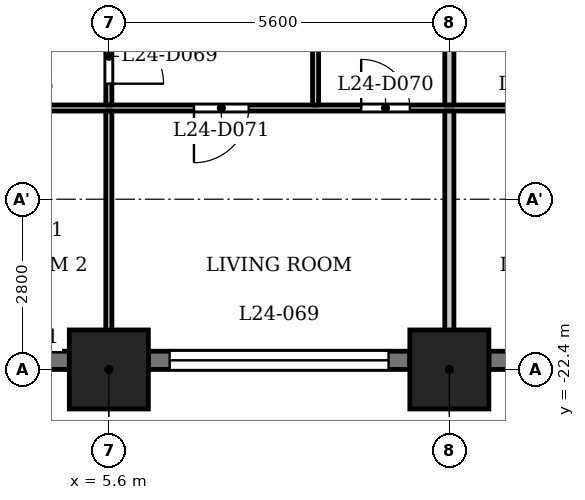
"""IFC4 building model, lengths in metres.
Left out: names, types, materials, properties, quantities, classifications, styles, units other than length and angle.
Written with IfcOpenShell. Run it as: python <this file> out.ifc"""

import sys

from ifc_helpers import new_model, si_unit, direction, frame, frame_2d, origin, origin_2d, place, context, subcontext, project, spatial, rectangle, extrude, element, fill, save


model = new_model("IFC4")
c1 = context("Model", 3, precision=1e-05, world=origin(), true_north=direction((0.0, 1.0)))
c2 = subcontext(c1, "Body", "Model", "MODEL_VIEW")
j1 = project(units=[si_unit("LENGTHUNIT", "METRE"), si_unit("PLANEANGLEUNIT", "RADIAN")], contexts=[c1])
p1 = place(None, origin())
s1 = spatial("IfcSite", under=j1, at=p1, CompositionType="ELEMENT")
p2 = place(p1, origin())
s2 = spatial("IfcBuilding", under=s1, at=p2, CompositionType="ELEMENT")
p3 = place(p2, frame((0.0, 0.0, 97.3)))
s3 = spatial("IfcBuildingStorey", under=s2, at=p3, CompositionType="ELEMENT", Elevation=97.3)
for number, where, z_axis, x_axis in (
    (1, (5.6, -22.4, 0.0), (0.0, 0.0, 1.0), (1.0, 0.0, 0.0)),
    (2, (11.2, -22.4, 0.0), (0.0, 0.0, 1.0), (1.0, 0.0, 0.0)),
):
    element("IfcColumn", number, at=place(p3, frame(where, z_axis=z_axis, x_axis=x_axis)), inside=s3, PredefinedType="COLUMN", context=c2, shape_type="SweptSolid", body=[
        extrude(rectangle(XDim=1.3, YDim=1.3, at=origin_2d()), origin(), (0.0, 0.0, 1.0), 3.5),
    ])
p4 = place(p3, frame((0.65, -22.25, 0.0), z_axis=(0.0, 0.0, 1.0), x_axis=(1.0, 0.0, 0.0)))
e3 = element("IfcWall", 3, at=p4, inside=s3, PredefinedType="SOLIDWALL", context=c2, shape_type="SweptSolid", body=[
    extrude(rectangle(XDim=4.3, YDim=0.3, at=frame_2d((2.15, 0.0))), origin(), (0.0, 0.0, 1.0), 2.4),
])
p5 = place(p4, frame((0.438, 0.0, 0.6)))
e4 = element("IfcOpeningElement", 4, at=p5, cuts=e3, PredefinedType="OPENING", context=c2, shape_type="SweptSolid", body=[
    extrude(rectangle(XDim=1.2, YDim=1.55, at=frame_2d((0.6, 0.775))), frame((0.0, 0.16, 0.0), z_axis=(0.0, -1.0, 0.0), x_axis=(1.0, 0.0, 0.0)), (0.0, 0.0, 1.0), 0.32),
])
p6 = place(p4, frame((2.663, 0.0, 0.6)))
e5 = element("IfcOpeningElement", 5, at=p6, cuts=e3, PredefinedType="OPENING", context=c2, shape_type="SweptSolid", body=[
    extrude(rectangle(XDim=1.2, YDim=1.55, at=frame_2d((0.6, 0.775))), frame((0.0, 0.16, 0.0), z_axis=(0.0, -1.0, 0.0), x_axis=(1.0, 0.0, 0.0)), (0.0, 0.0, 1.0), 0.32),
])
p7 = place(p3, frame((6.25, -22.25, 0.0), z_axis=(0.0, 0.0, 1.0), x_axis=(1.0, 0.0, 0.0)))
e6 = element("IfcWall", 6, at=p7, inside=s3, PredefinedType="SOLIDWALL", context=c2, shape_type="SweptSolid", body=[
    extrude(rectangle(XDim=4.3, YDim=0.3, at=frame_2d((2.15, 0.0))), origin(), (0.0, 0.0, 1.0), 2.4),
])
p8 = place(p7, frame((0.35, 0.0, 1.2)))
e7 = element("IfcOpeningElement", 7, at=p8, cuts=e6, PredefinedType="OPENING", context=c2, shape_type="SweptSolid", body=[
    extrude(rectangle(XDim=3.6, YDim=0.95, at=frame_2d((1.8, 0.475))), frame((0.0, 0.16, 0.0), z_axis=(0.0, -1.0, 0.0), x_axis=(1.0, 0.0, 0.0)), (0.0, 0.0, 1.0), 0.32),
])
p9 = place(p3, frame((11.85, -22.25, 0.0), z_axis=(0.0, 0.0, 1.0), x_axis=(1.0, 0.0, 0.0)))
e8 = element("IfcWall", 8, at=p9, inside=s3, PredefinedType="SOLIDWALL", context=c2, shape_type="SweptSolid", body=[
    extrude(rectangle(XDim=4.3, YDim=0.3, at=frame_2d((2.15, 0.0))), origin(), (0.0, 0.0, 1.0), 2.4),
])
p10 = place(p9, frame((0.35, 0.0, 1.2)))
e9 = element("IfcOpeningElement", 9, at=p10, cuts=e8, PredefinedType="OPENING", context=c2, shape_type="SweptSolid", body=[
    extrude(rectangle(XDim=3.6, YDim=0.95, at=frame_2d((1.8, 0.475))), frame((0.0, 0.16, 0.0), z_axis=(0.0, -1.0, 0.0), x_axis=(1.0, 0.0, 0.0)), (0.0, 0.0, 1.0), 0.32),
])
p11 = place(p3, frame((-26.19, -18.1, 0.0), z_axis=(0.0, 0.0, 1.0), x_axis=(1.0, 0.0, 0.0)))
e10 = element("IfcWall", 10, at=p11, inside=s3, PredefinedType="PARTITIONING", context=c2, shape_type="SweptSolid", body=[
    extrude(rectangle(XDim=52.63, YDim=0.1, at=frame_2d((26.315, 0.0))), origin(), (0.0, 0.0, 1.0), 3.2),
])
p12 = place(p11, frame((1.09, 0.0, 0.0)))
e11 = element("IfcOpeningElement", 11, at=p12, cuts=e10, PredefinedType="OPENING", context=c2, shape_type="SweptSolid", body=[
    extrude(rectangle(XDim=0.8, YDim=2.1, at=frame_2d((0.4, 1.05))), frame((0.0, 0.06, 0.0), z_axis=(0.0, -1.0, 0.0), x_axis=(1.0, 0.0, 0.0)), (0.0, 0.0, 1.0), 0.12),
])
p13 = place(p11, frame((4.44, 0.0, 0.0)))
e12 = element("IfcOpeningElement", 12, at=p13, cuts=e10, PredefinedType="OPENING", context=c2, shape_type="SweptSolid", body=[
    extrude(rectangle(XDim=0.9, YDim=2.1, at=frame_2d((0.45, 1.05))), frame((0.0, 0.06, 0.0), z_axis=(0.0, -1.0, 0.0), x_axis=(1.0, 0.0, 0.0)), (0.0, 0.0, 1.0), 0.12),
])
p14 = place(p11, frame((10.04, 0.0, 0.0)))
e13 = element("IfcOpeningElement", 13, at=p14, cuts=e10, PredefinedType="OPENING", context=c2, shape_type="SweptSolid", body=[
    extrude(rectangle(XDim=0.8, YDim=2.1, at=frame_2d((0.4, 1.05))), frame((0.0, 0.06, 0.0), z_axis=(0.0, -1.0, 0.0), x_axis=(1.0, 0.0, 0.0)), (0.0, 0.0, 1.0), 0.12),
])
p15 = place(p11, frame((15.64, 0.0, 0.0)))
e14 = element("IfcOpeningElement", 14, at=p15, cuts=e10, PredefinedType="OPENING", context=c2, shape_type="SweptSolid", body=[
    extrude(rectangle(XDim=0.9, YDim=2.1, at=frame_2d((0.45, 1.05))), frame((0.0, 0.06, 0.0), z_axis=(0.0, -1.0, 0.0), x_axis=(1.0, 0.0, 0.0)), (0.0, 0.0, 1.0), 0.12),
])
p16 = place(p11, frame((24.74, 0.0, 0.0)))
e15 = element("IfcOpeningElement", 15, at=p16, cuts=e10, PredefinedType="OPENING", context=c2, shape_type="SweptSolid", body=[
    extrude(rectangle(XDim=0.8, YDim=2.1, at=frame_2d((0.4, 1.05))), frame((0.0, 0.06, 0.0), z_axis=(0.0, -1.0, 0.0), x_axis=(1.0, 0.0, 0.0)), (0.0, 0.0, 1.0), 0.12),
])
p17 = place(p11, frame((21.24, 0.0, 0.0)))
e16 = element("IfcOpeningElement", 16, at=p17, cuts=e10, PredefinedType="OPENING", context=c2, shape_type="SweptSolid", body=[
    extrude(rectangle(XDim=0.9, YDim=2.1, at=frame_2d((0.45, 1.05))), frame((0.0, 0.06, 0.0), z_axis=(0.0, -1.0, 0.0), x_axis=(1.0, 0.0, 0.0)), (0.0, 0.0, 1.0), 0.12),
])
p18 = place(p11, frame((35.94, 0.0, 0.0)))
e17 = element("IfcOpeningElement", 17, at=p18, cuts=e10, PredefinedType="OPENING", context=c2, shape_type="SweptSolid", body=[
    extrude(rectangle(XDim=0.8, YDim=2.1, at=frame_2d((0.4, 1.05))), frame((0.0, 0.06, 0.0), z_axis=(0.0, -1.0, 0.0), x_axis=(1.0, 0.0, 0.0)), (0.0, 0.0, 1.0), 0.12),
])
p19 = place(p11, frame((33.19, 0.0, 0.0)))
e18 = element("IfcOpeningElement", 18, at=p19, cuts=e10, PredefinedType="OPENING", context=c2, shape_type="SweptSolid", body=[
    extrude(rectangle(XDim=0.9, YDim=2.1, at=frame_2d((0.45, 1.05))), frame((0.0, 0.06, 0.0), z_axis=(0.0, -1.0, 0.0), x_axis=(1.0, 0.0, 0.0)), (0.0, 0.0, 1.0), 0.12),
])
p20 = place(p11, frame((27.59, 0.0, 0.0)))
e19 = element("IfcOpeningElement", 19, at=p20, cuts=e10, PredefinedType="OPENING", context=c2, shape_type="SweptSolid", body=[
    extrude(rectangle(XDim=0.9, YDim=2.1, at=frame_2d((0.45, 1.05))), frame((0.0, 0.06, 0.0), z_axis=(0.0, -1.0, 0.0), x_axis=(1.0, 0.0, 0.0)), (0.0, 0.0, 1.0), 0.12),
])
p21 = place(p11, frame((29.64, 0.0, 0.0)))
e20 = element("IfcOpeningElement", 20, at=p21, cuts=e10, PredefinedType="OPENING", context=c2, shape_type="SweptSolid", body=[
    extrude(rectangle(XDim=0.9, YDim=2.1, at=frame_2d((0.45, 1.05))), frame((0.0, 0.06, 0.0), z_axis=(0.0, -1.0, 0.0), x_axis=(1.0, 0.0, 0.0)), (0.0, 0.0, 1.0), 0.12),
])
p22 = place(p11, frame((41.54, 0.0, 0.0)))
e21 = element("IfcOpeningElement", 21, at=p22, cuts=e10, PredefinedType="OPENING", context=c2, shape_type="SweptSolid", body=[
    extrude(rectangle(XDim=0.8, YDim=2.1, at=frame_2d((0.4, 1.05))), frame((0.0, 0.06, 0.0), z_axis=(0.0, -1.0, 0.0), x_axis=(1.0, 0.0, 0.0)), (0.0, 0.0, 1.0), 0.12),
])
p23 = place(p11, frame((38.54, 0.0, 0.0)))
e22 = element("IfcOpeningElement", 22, at=p23, cuts=e10, PredefinedType="OPENING", context=c2, shape_type="SweptSolid", body=[
    extrude(rectangle(XDim=0.9, YDim=2.1, at=frame_2d((0.45, 1.05))), frame((0.0, 0.06, 0.0), z_axis=(0.0, -1.0, 0.0), x_axis=(1.0, 0.0, 0.0)), (0.0, 0.0, 1.0), 0.12),
])
p24 = place(p11, frame((49.204, 0.0, 0.0)))
e23 = element("IfcOpeningElement", 23, at=p24, cuts=e10, PredefinedType="OPENING", context=c2, shape_type="SweptSolid", body=[
    extrude(rectangle(XDim=0.8, YDim=2.1, at=frame_2d((0.4, 1.05))), frame((0.0, 0.06, 0.0), z_axis=(0.0, -1.0, 0.0), x_axis=(1.0, 0.0, 0.0)), (0.0, 0.0, 1.0), 0.12),
])
p25 = place(p11, frame((43.64, 0.0, 0.0)))
e24 = element("IfcOpeningElement", 24, at=p25, cuts=e10, PredefinedType="OPENING", context=c2, shape_type="SweptSolid", body=[
    extrude(rectangle(XDim=0.9, YDim=2.1, at=frame_2d((0.45, 1.05))), frame((0.0, 0.06, 0.0), z_axis=(0.0, -1.0, 0.0), x_axis=(1.0, 0.0, 0.0)), (0.0, 0.0, 1.0), 0.12),
])
p26 = place(p3, frame((5.6, -23.03, 0.0), z_axis=(0.0, 0.0, 1.0), x_axis=(0.0, 1.0, 0.0)))
e25 = element("IfcWall", 25, at=p26, inside=s3, PredefinedType="PARTITIONING", context=c2, shape_type="SweptSolid", body=[
    extrude(rectangle(XDim=4.88, YDim=0.1, at=frame_2d((2.44, 0.0))), origin(), (0.0, 0.0, 1.0), 3.2),
])
p27 = place(p3, frame((5.6, -18.05, 0.0), z_axis=(0.0, 0.0, 1.0), x_axis=(0.0, 1.0, 0.0)))
e26 = element("IfcWall", 26, at=p27, inside=s3, PredefinedType="PARTITIONING", context=c2, shape_type="SweptSolid", body=[
    extrude(rectangle(XDim=2.575, YDim=0.1, at=frame_2d((1.288, 0.0))), origin(), (0.0, 0.0, 1.0), 3.2),
])
p28 = place(p27, frame((0.35, 0.0, 0.0)))
e27 = element("IfcOpeningElement", 27, at=p28, cuts=e26, PredefinedType="OPENING", context=c2, shape_type="SweptSolid", body=[
    extrude(rectangle(XDim=0.9, YDim=2.1, at=frame_2d((0.45, 1.05))), frame((0.0, 0.06, 0.0), z_axis=(0.0, -1.0, 0.0), x_axis=(1.0, 0.0, 0.0)), (0.0, 0.0, 1.0), 0.12),
])
p29 = place(p3, frame((9.0, -18.05, 0.0), z_axis=(0.0, 0.0, 1.0), x_axis=(0.0, 1.0, 0.0)))
e28 = element("IfcWall", 28, at=p29, inside=s3, PredefinedType="PARTITIONING", context=c2, shape_type="SweptSolid", body=[
    extrude(rectangle(XDim=2.575, YDim=0.1, at=frame_2d((1.288, 0.0))), origin(), (0.0, 0.0, 1.0), 3.2),
])
p30 = place(p3, frame((11.2, -23.03, 0.0), z_axis=(0.0, 0.0, 1.0), x_axis=(0.0, 1.0, 0.0)))
e29 = element("IfcWall", 29, at=p30, inside=s3, PredefinedType="PARTITIONING", context=c2, shape_type="SweptSolid", body=[
    extrude(rectangle(XDim=4.88, YDim=0.15, at=frame_2d((2.44, 0.0))), origin(), (0.0, 0.0, 1.0), 3.2),
])
p31 = place(p3, frame((11.2, -18.05, 0.0), z_axis=(0.0, 0.0, 1.0), x_axis=(0.0, 1.0, 0.0)))
e30 = element("IfcWall", 30, at=p31, inside=s3, PredefinedType="PARTITIONING", context=c2, shape_type="SweptSolid", body=[
    extrude(rectangle(XDim=2.575, YDim=0.15, at=frame_2d((1.288, 0.0))), origin(), (0.0, 0.0, 1.0), 3.2),
])
p32 = place(p28, origin())
e31 = element("IfcDoor", 31, at=p32, inside=s3, OperationType="SINGLE_SWING_LEFT", PredefinedType="DOOR", context=c2, shape_type="SweptSolid", body=[
    extrude(rectangle(XDim=0.9, YDim=2.1, at=frame_2d((0.45, 1.05))), frame((0.0, 0.025, 0.0), z_axis=(0.0, -1.0, 0.0), x_axis=(1.0, 0.0, 0.0)), (0.0, 0.0, 1.0), 0.05),
])
fill(e27, e31)
p33 = place(p18, origin())
e32 = element("IfcDoor", 32, at=p33, inside=s3, OperationType="SINGLE_SWING_RIGHT", PredefinedType="DOOR", context=c2, shape_type="SweptSolid", body=[
    extrude(rectangle(XDim=0.8, YDim=2.1, at=frame_2d((0.4, 1.05))), frame((0.0, 0.025, 0.0), z_axis=(0.0, -1.0, 0.0), x_axis=(1.0, 0.0, 0.0)), (0.0, 0.0, 1.0), 0.05),
])
fill(e17, e32)
p34 = place(p19, origin())
e33 = element("IfcDoor", 33, at=p34, inside=s3, OperationType="SINGLE_SWING_LEFT", PredefinedType="DOOR", context=c2, shape_type="SweptSolid", body=[
    extrude(rectangle(XDim=0.9, YDim=2.1, at=frame_2d((0.45, 1.05))), frame((0.0, 0.025, 0.0), z_axis=(0.0, -1.0, 0.0), x_axis=(1.0, 0.0, 0.0)), (0.0, 0.0, 1.0), 0.05),
])
fill(e18, e33)
p35 = place(p8, origin())
e34 = element("IfcWindow", 34, at=p35, inside=s3, PartitioningType="SINGLE_PANEL", PredefinedType="WINDOW", context=c2, shape_type="SweptSolid", body=[
    extrude(rectangle(XDim=3.6, YDim=0.95, at=frame_2d((1.8, 0.475))), frame((0.0, 0.03, 0.0), z_axis=(0.0, -1.0, 0.0), x_axis=(1.0, 0.0, 0.0)), (0.0, 0.0, 1.0), 0.06),
])
fill(e7, e34)
save(model, sys.argv[1])
